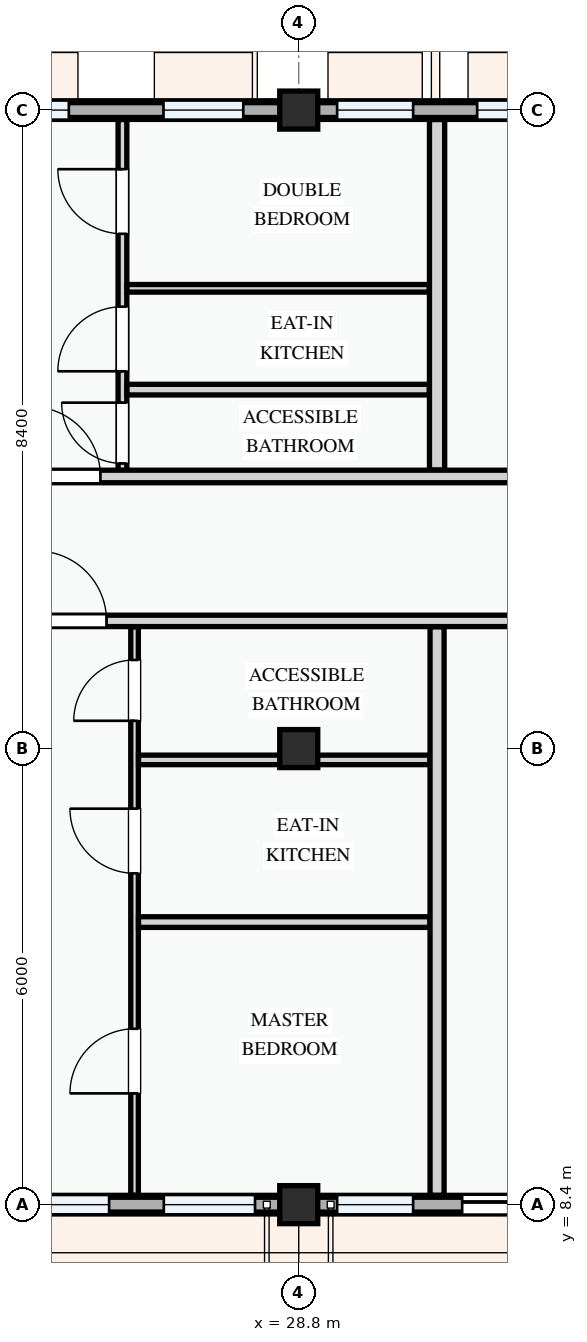
"""IFC4 building model, lengths in metres.
Left out: names, types, materials, properties, quantities, classifications, styles, units other than length and angle.
Written with IfcOpenShell. Run it as: python <this file> out.ifc"""

import sys

from ifc_helpers import new_model, si_unit, direction, frame, frame_2d, origin, origin_2d, place, context, subcontext, project, spatial, polyline, rectangle, outline, extrude, element, fill, save


model = new_model("IFC4")
c1 = context("Model", 3, precision=1e-05, world=origin(), true_north=direction((0.0, 1.0)))
c2 = subcontext(c1, "Body", "Model", "MODEL_VIEW")
j1 = project(units=[si_unit("LENGTHUNIT", "METRE"), si_unit("PLANEANGLEUNIT", "RADIAN")], contexts=[c1])
p1 = place(None, origin())
s1 = spatial("IfcSite", under=j1, at=p1, CompositionType="ELEMENT")
p2 = place(p1, origin())
s2 = spatial("IfcBuilding", under=s1, at=p2, CompositionType="ELEMENT")
p3 = place(p2, frame((0.0, 0.0, 34.5)))
s3 = spatial("IfcBuildingStorey", under=s2, at=p3, CompositionType="ELEMENT", Elevation=34.5)
for number, where, z_axis, x_axis in (
    (1, (28.8, 8.4, 0.0), (0.0, 0.0, 1.0), (1.0, 0.0, 0.0)),
    (2, (28.8, 14.4, 0.0), (0.0, 0.0, 1.0), (1.0, 0.0, 0.0)),
    (3, (28.8, 22.8, 0.0), (0.0, 0.0, 1.0), (1.0, 0.0, 0.0)),
):
    element("IfcColumn", number, at=place(p3, frame(where, z_axis=z_axis, x_axis=x_axis)), inside=s3, PredefinedType="COLUMN", context=c2, shape_type="SweptSolid", body=[
        extrude(rectangle(XDim=0.5, YDim=0.5, at=origin_2d()), origin(), (0.0, 0.0, 1.0), 3.3),
    ])
p4 = place(p3, frame((22.8, 8.4, 0.0), z_axis=(0.0, 0.0, 1.0), x_axis=(1.0, 0.0, 0.0)))
e4 = element("IfcWall", 4, at=p4, inside=s3, PredefinedType="STANDARD", context=c2, shape_type="SweptSolid", body=[
    extrude(rectangle(XDim=6.0, YDim=0.245, at=frame_2d((3.0, 0.0))), origin(), (0.0, 0.0, 1.0), 2.525),
])
p5 = place(p4, frame((0.62, 0.0, 0.0)))
e5 = element("IfcOpeningElement", 5, at=p5, cuts=e4, PredefinedType="OPENING", context=c2, shape_type="SweptSolid", body=[
    extrude(rectangle(XDim=1.3, YDim=2.15, at=frame_2d((0.65, 1.075))), frame((0.0, 0.133, 0.0), z_axis=(0.0, -1.0, 0.0), x_axis=(1.0, 0.0, 0.0)), (0.0, 0.0, 1.0), 0.265),
])
p6 = place(p4, frame((2.305, 0.0, 0.78)))
e6 = element("IfcOpeningElement", 6, at=p6, cuts=e4, PredefinedType="OPENING", context=c2, shape_type="SweptSolid", body=[
    extrude(rectangle(XDim=1.2, YDim=1.5, at=frame_2d((0.6, 0.75))), frame((0.0, 0.133, 0.0), z_axis=(0.0, -1.0, 0.0), x_axis=(1.0, 0.0, 0.0)), (0.0, 0.0, 1.0), 0.265),
])
p7 = place(p4, frame((4.225, 0.0, 0.78)))
e7 = element("IfcOpeningElement", 7, at=p7, cuts=e4, PredefinedType="OPENING", context=c2, shape_type="SweptSolid", body=[
    extrude(rectangle(XDim=1.2, YDim=1.35, at=frame_2d((0.6, 0.675))), frame((0.0, 0.133, 0.0), z_axis=(0.0, -1.0, 0.0), x_axis=(1.0, 0.0, 0.0)), (0.0, 0.0, 1.0), 0.265),
])
p8 = place(p3, frame((28.8, 8.4, 0.0), z_axis=(0.0, 0.0, 1.0), x_axis=(1.0, 0.0, 0.0)))
e8 = element("IfcWall", 8, at=p8, inside=s3, PredefinedType="STANDARD", context=c2, shape_type="SweptSolid", body=[
    extrude(rectangle(XDim=8.4, YDim=0.245, at=frame_2d((4.2, 0.0))), origin(), (0.0, 0.0, 1.0), 2.375),
])
p9 = place(p8, frame((2.15, 0.0, 0.0)))
e9 = element("IfcOpeningElement", 9, at=p9, cuts=e8, PredefinedType="OPENING", context=c2, shape_type="SweptSolid", body=[
    extrude(rectangle(XDim=1.4, YDim=2.2, at=frame_2d((0.7, 1.1))), frame((0.0, 0.133, 0.0), z_axis=(0.0, -1.0, 0.0), x_axis=(1.0, 0.0, 0.0)), (0.0, 0.0, 1.0), 0.265),
])
p10 = place(p8, frame((0.505, 0.0, 0.78)))
e10 = element("IfcOpeningElement", 10, at=p10, cuts=e8, PredefinedType="OPENING", context=c2, shape_type="SweptSolid", body=[
    extrude(rectangle(XDim=1.0, YDim=1.25, at=frame_2d((0.5, 0.625))), frame((0.0, 0.133, 0.0), z_axis=(0.0, -1.0, 0.0), x_axis=(1.0, 0.0, 0.0)), (0.0, 0.0, 1.0), 0.265),
])
p11 = place(p8, frame((4.54, 0.0, 0.78)))
e11 = element("IfcOpeningElement", 11, at=p11, cuts=e8, PredefinedType="OPENING", context=c2, shape_type="SweptSolid", body=[
    extrude(rectangle(XDim=1.2, YDim=1.35, at=frame_2d((0.6, 0.675))), frame((0.0, 0.133, 0.0), z_axis=(0.0, -1.0, 0.0), x_axis=(1.0, 0.0, 0.0)), (0.0, 0.0, 1.0), 0.265),
])
p12 = place(p8, frame((6.97, 0.0, 0.78)))
e12 = element("IfcOpeningElement", 12, at=p12, cuts=e8, PredefinedType="OPENING", context=c2, shape_type="SweptSolid", body=[
    extrude(rectangle(XDim=0.95, YDim=1.15, at=frame_2d((0.475, 0.575))), frame((0.0, 0.133, 0.0), z_axis=(0.0, -1.0, 0.0), x_axis=(1.0, 0.0, 0.0)), (0.0, 0.0, 1.0), 0.265),
])
p13 = place(p3, frame((37.2, 22.8, 0.0), z_axis=(0.0, 0.0, 1.0), x_axis=(-1.0, 0.0, 0.0)))
e13 = element("IfcWall", 13, at=p13, inside=s3, PredefinedType="STANDARD", context=c2, shape_type="SweptSolid", body=[
    extrude(rectangle(XDim=8.4, YDim=0.245, at=frame_2d((4.2, 0.0))), origin(), (0.0, 0.0, 1.0), 2.375),
])
p14 = place(p13, frame((0.505, 0.0, 0.78)))
e14 = element("IfcOpeningElement", 14, at=p14, cuts=e13, PredefinedType="OPENING", context=c2, shape_type="SweptSolid", body=[
    extrude(rectangle(XDim=0.95, YDim=1.15, at=frame_2d((0.475, 0.575))), frame((0.0, 0.133, 0.0), z_axis=(0.0, -1.0, 0.0), x_axis=(1.0, 0.0, 0.0)), (0.0, 0.0, 1.0), 0.265),
])
p15 = place(p13, frame((2.533, 0.0, 0.78)))
e15 = element("IfcOpeningElement", 15, at=p15, cuts=e13, PredefinedType="OPENING", context=c2, shape_type="SweptSolid", body=[
    extrude(rectangle(XDim=0.95, YDim=1.15, at=frame_2d((0.475, 0.575))), frame((0.0, 0.133, 0.0), z_axis=(0.0, -1.0, 0.0), x_axis=(1.0, 0.0, 0.0)), (0.0, 0.0, 1.0), 0.265),
])
p16 = place(p13, frame((4.633, 0.0, 0.78)))
e16 = element("IfcOpeningElement", 16, at=p16, cuts=e13, PredefinedType="OPENING", context=c2, shape_type="SweptSolid", body=[
    extrude(rectangle(XDim=1.42, YDim=1.38, at=frame_2d((0.71, 0.69))), frame((0.0, 0.133, 0.0), z_axis=(0.0, -1.0, 0.0), x_axis=(1.0, 0.0, 0.0)), (0.0, 0.0, 1.0), 0.265),
])
p17 = place(p13, frame((6.895, 0.0, 0.78)))
e17 = element("IfcOpeningElement", 17, at=p17, cuts=e13, PredefinedType="OPENING", context=c2, shape_type="SweptSolid", body=[
    extrude(rectangle(XDim=1.0, YDim=1.25, at=frame_2d((0.5, 0.625))), frame((0.0, 0.133, 0.0), z_axis=(0.0, -1.0, 0.0), x_axis=(1.0, 0.0, 0.0)), (0.0, 0.0, 1.0), 0.265),
])
p18 = place(p3, frame((28.8, 22.8, 0.0), z_axis=(0.0, 0.0, 1.0), x_axis=(-1.0, 0.0, 0.0)))
e18 = element("IfcWall", 18, at=p18, inside=s3, PredefinedType="STANDARD", context=c2, shape_type="SweptSolid", body=[
    extrude(rectangle(XDim=6.0, YDim=0.245, at=frame_2d((3.0, 0.0))), origin(), (0.0, 0.0, 1.0), 2.525),
])
p19 = place(p18, frame((0.729, 0.0, 0.78)))
e19 = element("IfcOpeningElement", 19, at=p19, cuts=e18, PredefinedType="OPENING", context=c2, shape_type="SweptSolid", body=[
    extrude(rectangle(XDim=1.05, YDim=1.2, at=frame_2d((0.525, 0.6))), frame((0.0, 0.133, 0.0), z_axis=(0.0, -1.0, 0.0), x_axis=(1.0, 0.0, 0.0)), (0.0, 0.0, 1.0), 0.265),
])
p20 = place(p18, frame((3.025, 0.0, 0.78)))
e20 = element("IfcOpeningElement", 20, at=p20, cuts=e18, PredefinedType="OPENING", context=c2, shape_type="SweptSolid", body=[
    extrude(rectangle(XDim=2.08, YDim=1.52, at=frame_2d((1.04, 0.76))), frame((0.0, 0.133, 0.0), z_axis=(0.0, -1.0, 0.0), x_axis=(1.0, 0.0, 0.0)), (0.0, 0.0, 1.0), 0.265),
])
p21 = place(p3, frame((22.8, 8.4, 3.3), z_axis=(0.0, 0.0, 1.0), x_axis=(1.0, 0.0, 0.0)))
e21 = element("IfcWall", 21, at=p21, inside=s3, PredefinedType="PARAPET", context=c2, shape_type="SweptSolid", body=[
    extrude(outline(polyline([(0.0, 0.0), (6.0, 0.0), (6.0, 1.12), (5.5, 1.322), (5.0, 1.484), (4.5, 1.618), (4.0, 1.717), (3.5, 1.779), (3.0, 1.8), (2.5, 1.779), (2.0, 1.717), (1.5, 1.618), (1.0, 1.484), (0.5, 1.322), (0.0, 1.12), (0.0, 0.0)])), frame((0.0, 0.098, 0.0), z_axis=(0.0, -1.0, 0.0), x_axis=(1.0, 0.0, 0.0)), (0.0, 0.0, 1.0), 0.195),
])
p22 = place(p3, frame((28.8, 8.4, 3.3), z_axis=(0.0, 0.0, 1.0), x_axis=(1.0, 0.0, 0.0)))
e22 = element("IfcWall", 22, at=p22, inside=s3, PredefinedType="PARAPET", context=c2, shape_type="SweptSolid", body=[
    extrude(outline(polyline([(0.0, 0.0), (8.4, 0.0), (8.4, 1.12), (7.7, 1.322), (7.0, 1.484), (6.3, 1.618), (5.6, 1.717), (4.9, 1.779), (4.2, 1.8), (3.5, 1.779), (2.8, 1.717), (2.1, 1.618), (1.4, 1.484), (0.7, 1.322), (0.0, 1.12), (0.0, 0.0)])), frame((0.0, 0.098, 0.0), z_axis=(0.0, -1.0, 0.0), x_axis=(1.0, 0.0, 0.0)), (0.0, 0.0, 1.0), 0.195),
])
p23 = place(p3, frame((43.2, 22.8, 3.3), z_axis=(0.0, 0.0, 1.0), x_axis=(-1.0, 0.0, 0.0)))
e23 = element("IfcWall", 23, at=p23, inside=s3, PredefinedType="PARAPET", context=c2, shape_type="SweptSolid", body=[
    extrude(rectangle(XDim=20.4, YDim=0.195, at=frame_2d((10.2, 0.0))), origin(), (0.0, 0.0, 1.0), 1.15),
])
p24 = place(p3, frame((26.64, 8.524, 0.0), z_axis=(0.0, 0.0, 1.0), x_axis=(0.0, 1.0, 0.0)))
e24 = element("IfcWall", 24, at=p24, inside=s3, PredefinedType="PARTITIONING", context=c2, shape_type="SweptSolid", body=[
    extrude(rectangle(XDim=7.479, YDim=0.1, at=frame_2d((3.739, 0.0))), origin(), (0.0, 0.0, 1.0), 3.0),
])
p25 = place(p24, frame((1.339, 0.0, 0.0)))
e25 = element("IfcOpeningElement", 25, at=p25, cuts=e24, PredefinedType="OPENING", context=c2, shape_type="SweptSolid", body=[
    extrude(rectangle(XDim=0.85, YDim=2.1, at=frame_2d((0.425, 1.05))), frame((0.0, 0.06, 0.0), z_axis=(0.0, -1.0, 0.0), x_axis=(1.0, 0.0, 0.0)), (0.0, 0.0, 1.0), 0.12),
])
p26 = place(p24, frame((4.235, 0.0, 0.0)))
e26 = element("IfcOpeningElement", 26, at=p26, cuts=e24, PredefinedType="OPENING", context=c2, shape_type="SweptSolid", body=[
    extrude(rectangle(XDim=0.85, YDim=2.1, at=frame_2d((0.425, 1.05))), frame((0.0, 0.06, 0.0), z_axis=(0.0, -1.0, 0.0), x_axis=(1.0, 0.0, 0.0)), (0.0, 0.0, 1.0), 0.12),
])
p27 = place(p24, frame((6.241, 0.0, 0.0)))
e27 = element("IfcOpeningElement", 27, at=p27, cuts=e24, PredefinedType="OPENING", context=c2, shape_type="SweptSolid", body=[
    extrude(rectangle(XDim=0.8, YDim=2.1, at=frame_2d((0.4, 1.05))), frame((0.0, 0.06, 0.0), z_axis=(0.0, -1.0, 0.0), x_axis=(1.0, 0.0, 0.0)), (0.0, 0.0, 1.0), 0.12),
])
p28 = place(p3, frame((26.692, 12.118, 0.0), z_axis=(0.0, 0.0, 1.0), x_axis=(1.0, 0.0, 0.0)))
e28 = element("IfcWall", 28, at=p28, inside=s3, PredefinedType="PARTITIONING", context=c2, shape_type="SweptSolid", body=[
    extrude(rectangle(XDim=3.833, YDim=0.14, at=frame_2d((1.917, 0.0))), origin(), (0.0, 0.0, 1.0), 3.0),
])
p29 = place(p3, frame((26.692, 14.251, 0.0), z_axis=(0.0, 0.0, 1.0), x_axis=(1.0, 0.0, 0.0)))
e29 = element("IfcWall", 29, at=p29, inside=s3, PredefinedType="PARTITIONING", context=c2, shape_type="SweptSolid", body=[
    extrude(rectangle(XDim=3.833, YDim=0.125, at=frame_2d((1.917, 0.0))), origin(), (0.0, 0.0, 1.0), 2.375),
])
p30 = place(p3, frame((26.481, 17.98, 0.0), z_axis=(0.0, 0.0, 1.0), x_axis=(0.0, 1.0, 0.0)))
e30 = element("IfcWall", 30, at=p30, inside=s3, PredefinedType="PARTITIONING", context=c2, shape_type="SweptSolid", body=[
    extrude(rectangle(XDim=4.696, YDim=0.115, at=frame_2d((2.348, 0.0))), origin(), (0.0, 0.0, 1.0), 3.0),
])
p31 = place(p30, frame((0.171, 0.0, 0.0)))
e31 = element("IfcOpeningElement", 31, at=p31, cuts=e30, PredefinedType="OPENING", context=c2, shape_type="SweptSolid", body=[
    extrude(rectangle(XDim=0.8, YDim=2.1, at=frame_2d((0.4, 1.05))), frame((0.0, 0.067, 0.0), z_axis=(0.0, -1.0, 0.0), x_axis=(1.0, 0.0, 0.0)), (0.0, 0.0, 1.0), 0.135),
])
p32 = place(p30, frame((1.384, 0.0, 0.0)))
e32 = element("IfcOpeningElement", 32, at=p32, cuts=e30, PredefinedType="OPENING", context=c2, shape_type="SweptSolid", body=[
    extrude(rectangle(XDim=0.85, YDim=2.1, at=frame_2d((0.425, 1.05))), frame((0.0, 0.067, 0.0), z_axis=(0.0, -1.0, 0.0), x_axis=(1.0, 0.0, 0.0)), (0.0, 0.0, 1.0), 0.135),
])
p33 = place(p30, frame((3.193, 0.0, 0.0)))
e33 = element("IfcOpeningElement", 33, at=p33, cuts=e30, PredefinedType="OPENING", context=c2, shape_type="SweptSolid", body=[
    extrude(rectangle(XDim=0.85, YDim=2.1, at=frame_2d((0.425, 1.05))), frame((0.0, 0.067, 0.0), z_axis=(0.0, -1.0, 0.0), x_axis=(1.0, 0.0, 0.0)), (0.0, 0.0, 1.0), 0.135),
])
p34 = place(p3, frame((26.54, 20.455, 0.0), z_axis=(0.0, 0.0, 1.0), x_axis=(1.0, 0.0, 0.0)))
e34 = element("IfcWall", 34, at=p34, inside=s3, PredefinedType="PARTITIONING", context=c2, shape_type="SweptSolid", body=[
    extrude(rectangle(XDim=3.978, YDim=0.1, at=frame_2d((1.989, 0.0))), origin(), (0.0, 0.0, 1.0), 3.0),
])
p35 = place(p3, frame((26.54, 19.122, 0.0), z_axis=(0.0, 0.0, 1.0), x_axis=(1.0, 0.0, 0.0)))
e35 = element("IfcWall", 35, at=p35, inside=s3, PredefinedType="PARTITIONING", context=c2, shape_type="SweptSolid", body=[
    extrude(rectangle(XDim=3.978, YDim=0.14, at=frame_2d((1.989, 0.0))), origin(), (0.0, 0.0, 1.0), 3.0),
])
p36 = place(p3, frame((30.62, 8.524, 0.0), z_axis=(0.0, 0.0, 1.0), x_axis=(0.0, 1.0, 0.0)))
e36 = element("IfcWall", 36, at=p36, inside=s3, PredefinedType="PARTITIONING", context=c2, shape_type="SweptSolid", body=[
    extrude(rectangle(XDim=7.479, YDim=0.185, at=frame_2d((3.739, 0.0))), origin(), (0.0, 0.0, 1.0), 3.0),
])
p37 = place(p3, frame((30.62, 18.064, 0.0), z_axis=(0.0, 0.0, 1.0), x_axis=(0.0, 1.0, 0.0)))
e37 = element("IfcWall", 37, at=p37, inside=s3, PredefinedType="PARTITIONING", context=c2, shape_type="SweptSolid", body=[
    extrude(rectangle(XDim=4.611, YDim=0.2, at=frame_2d((2.306, 0.0))), origin(), (0.0, 0.0, 1.0), 3.0),
])
p38 = place(p3, frame((22.66, 16.08, 0.0), z_axis=(0.0, 0.0, 1.0), x_axis=(1.0, 0.0, 0.0)))
e38 = element("IfcWall", 38, at=p38, inside=s3, PredefinedType="PARTITIONING", context=c2, shape_type="SweptSolid", body=[
    extrude(rectangle(XDim=20.416, YDim=0.15, at=frame_2d((10.208, 0.0))), origin(), (0.0, 0.0, 1.0), 3.0),
])
p39 = place(p38, frame((2.691, 0.0, 0.0)))
e39 = element("IfcOpeningElement", 39, at=p39, cuts=e38, PredefinedType="OPENING", context=c2, shape_type="SweptSolid", body=[
    extrude(rectangle(XDim=0.92, YDim=2.1, at=frame_2d((0.46, 1.05))), frame((0.0, 0.085, 0.0), z_axis=(0.0, -1.0, 0.0), x_axis=(1.0, 0.0, 0.0)), (0.0, 0.0, 1.0), 0.17),
])
p40 = place(p38, frame((9.91, 0.0, 0.0)))
e40 = element("IfcOpeningElement", 40, at=p40, cuts=e38, PredefinedType="OPENING", context=c2, shape_type="SweptSolid", body=[
    extrude(rectangle(XDim=0.92, YDim=2.1, at=frame_2d((0.46, 1.05))), frame((0.0, 0.085, 0.0), z_axis=(0.0, -1.0, 0.0), x_axis=(1.0, 0.0, 0.0)), (0.0, 0.0, 1.0), 0.17),
])
p41 = place(p3, frame((22.66, 17.98, 0.0), z_axis=(0.0, 0.0, 1.0), x_axis=(1.0, 0.0, 0.0)))
e41 = element("IfcWall", 41, at=p41, inside=s3, PredefinedType="PARTITIONING", context=c2, shape_type="SweptSolid", body=[
    extrude(rectangle(XDim=20.416, YDim=0.165, at=frame_2d((10.208, 0.0))), origin(), (0.0, 0.0, 1.0), 3.0),
])
p42 = place(p41, frame((2.611, 0.0, 0.0)))
e42 = element("IfcOpeningElement", 42, at=p42, cuts=e41, PredefinedType="OPENING", context=c2, shape_type="SweptSolid", body=[
    extrude(rectangle(XDim=0.92, YDim=2.1, at=frame_2d((0.46, 1.05))), frame((0.0, 0.093, 0.0), z_axis=(0.0, -1.0, 0.0), x_axis=(1.0, 0.0, 0.0)), (0.0, 0.0, 1.0), 0.185),
])
p43 = place(p41, frame((9.885, 0.0, 0.0)))
e43 = element("IfcOpeningElement", 43, at=p43, cuts=e41, PredefinedType="OPENING", context=c2, shape_type="SweptSolid", body=[
    extrude(rectangle(XDim=0.96, YDim=2.12, at=frame_2d((0.48, 1.06))), frame((0.0, 0.093, 0.0), z_axis=(0.0, -1.0, 0.0), x_axis=(1.0, 0.0, 0.0)), (0.0, 0.0, 1.0), 0.185),
])
p44 = place(p6, origin())
e44 = element("IfcWindow", 44, at=p44, inside=s3, PartitioningType="SINGLE_PANEL", PredefinedType="WINDOW", context=c2, shape_type="SweptSolid", body=[
    extrude(rectangle(XDim=1.2, YDim=1.5, at=frame_2d((0.6, 0.75))), frame((0.0, 0.03, 0.0), z_axis=(0.0, -1.0, 0.0), x_axis=(1.0, 0.0, 0.0)), (0.0, 0.0, 1.0), 0.06),
])
fill(e6, e44)
p45 = place(p7, origin())
e45 = element("IfcWindow", 45, at=p45, inside=s3, PartitioningType="SINGLE_PANEL", PredefinedType="WINDOW", context=c2, shape_type="SweptSolid", body=[
    extrude(rectangle(XDim=1.2, YDim=1.35, at=frame_2d((0.6, 0.675))), frame((0.0, 0.03, 0.0), z_axis=(0.0, -1.0, 0.0), x_axis=(1.0, 0.0, 0.0)), (0.0, 0.0, 1.0), 0.06),
])
fill(e7, e45)
p46 = place(p9, frame((1.4, 0.0, 0.0), z_axis=(0.0, 0.0, 1.0), x_axis=(-1.0, 0.0, 0.0)))
e46 = element("IfcDoor", 46, at=p46, inside=s3, OperationType="SLIDING_TO_LEFT", PredefinedType="DOOR", context=c2, shape_type="SweptSolid", body=[
    extrude(rectangle(XDim=1.4, YDim=2.2, at=frame_2d((0.7, 1.1))), frame((0.0, 0.025, 0.0), z_axis=(0.0, -1.0, 0.0), x_axis=(1.0, 0.0, 0.0)), (0.0, 0.0, 1.0), 0.05),
])
fill(e9, e46)
p47 = place(p10, origin())
e47 = element("IfcWindow", 47, at=p47, inside=s3, PartitioningType="SINGLE_PANEL", PredefinedType="WINDOW", context=c2, shape_type="SweptSolid", body=[
    extrude(rectangle(XDim=1.0, YDim=1.25, at=frame_2d((0.5, 0.625))), frame((0.0, 0.03, 0.0), z_axis=(0.0, -1.0, 0.0), x_axis=(1.0, 0.0, 0.0)), (0.0, 0.0, 1.0), 0.06),
])
fill(e10, e47)
p48 = place(p16, origin())
e48 = element("IfcWindow", 48, at=p48, inside=s3, PartitioningType="SINGLE_PANEL", PredefinedType="WINDOW", context=c2, shape_type="SweptSolid", body=[
    extrude(rectangle(XDim=1.42, YDim=1.38, at=frame_2d((0.71, 0.69))), frame((0.0, 0.03, 0.0), z_axis=(0.0, -1.0, 0.0), x_axis=(1.0, 0.0, 0.0)), (0.0, 0.0, 1.0), 0.06),
])
fill(e16, e48)
p49 = place(p17, origin())
e49 = element("IfcWindow", 49, at=p49, inside=s3, PartitioningType="SINGLE_PANEL", PredefinedType="WINDOW", context=c2, shape_type="SweptSolid", body=[
    extrude(rectangle(XDim=1.0, YDim=1.25, at=frame_2d((0.5, 0.625))), frame((0.0, 0.03, 0.0), z_axis=(0.0, -1.0, 0.0), x_axis=(1.0, 0.0, 0.0)), (0.0, 0.0, 1.0), 0.06),
])
fill(e17, e49)
p50 = place(p19, origin())
e50 = element("IfcWindow", 50, at=p50, inside=s3, PartitioningType="SINGLE_PANEL", PredefinedType="WINDOW", context=c2, shape_type="SweptSolid", body=[
    extrude(rectangle(XDim=1.05, YDim=1.2, at=frame_2d((0.525, 0.6))), frame((0.0, 0.03, 0.0), z_axis=(0.0, -1.0, 0.0), x_axis=(1.0, 0.0, 0.0)), (0.0, 0.0, 1.0), 0.06),
])
fill(e19, e50)
p51 = place(p20, origin())
e51 = element("IfcWindow", 51, at=p51, inside=s3, PartitioningType="DOUBLE_PANEL_VERTICAL", PredefinedType="WINDOW", context=c2, shape_type="SweptSolid", body=[
    extrude(rectangle(XDim=2.08, YDim=1.52, at=frame_2d((1.04, 0.76))), frame((0.0, 0.03, 0.0), z_axis=(0.0, -1.0, 0.0), x_axis=(1.0, 0.0, 0.0)), (0.0, 0.0, 1.0), 0.06),
])
fill(e20, e51)
p52 = place(p25, origin())
e52 = element("IfcDoor", 52, at=p52, inside=s3, OperationType="SINGLE_SWING_LEFT", PredefinedType="DOOR", context=c2, shape_type="SweptSolid", body=[
    extrude(rectangle(XDim=0.85, YDim=2.1, at=frame_2d((0.425, 1.05))), frame((0.0, 0.025, 0.0), z_axis=(0.0, -1.0, 0.0), x_axis=(1.0, 0.0, 0.0)), (0.0, 0.0, 1.0), 0.05),
])
fill(e25, e52)
p53 = place(p26, origin())
e53 = element("IfcDoor", 53, at=p53, inside=s3, OperationType="SINGLE_SWING_RIGHT", PredefinedType="DOOR", context=c2, shape_type="SweptSolid", body=[
    extrude(rectangle(XDim=0.85, YDim=2.1, at=frame_2d((0.425, 1.05))), frame((0.0, 0.025, 0.0), z_axis=(0.0, -1.0, 0.0), x_axis=(1.0, 0.0, 0.0)), (0.0, 0.0, 1.0), 0.05),
])
fill(e26, e53)
p54 = place(p27, origin())
e54 = element("IfcDoor", 54, at=p54, inside=s3, OperationType="SINGLE_SWING_LEFT", PredefinedType="DOOR", context=c2, shape_type="SweptSolid", body=[
    extrude(rectangle(XDim=0.8, YDim=2.1, at=frame_2d((0.4, 1.05))), frame((0.0, 0.025, 0.0), z_axis=(0.0, -1.0, 0.0), x_axis=(1.0, 0.0, 0.0)), (0.0, 0.0, 1.0), 0.05),
])
fill(e27, e54)
p55 = place(p31, origin())
e55 = element("IfcDoor", 55, at=p55, inside=s3, OperationType="SINGLE_SWING_RIGHT", PredefinedType="DOOR", context=c2, shape_type="SweptSolid", body=[
    extrude(rectangle(XDim=0.8, YDim=2.1, at=frame_2d((0.4, 1.05))), frame((0.0, 0.025, 0.0), z_axis=(0.0, -1.0, 0.0), x_axis=(1.0, 0.0, 0.0)), (0.0, 0.0, 1.0), 0.05),
])
fill(e31, e55)
p56 = place(p32, origin())
e56 = element("IfcDoor", 56, at=p56, inside=s3, OperationType="SINGLE_SWING_LEFT", PredefinedType="DOOR", context=c2, shape_type="SweptSolid", body=[
    extrude(rectangle(XDim=0.85, YDim=2.1, at=frame_2d((0.425, 1.05))), frame((0.0, 0.025, 0.0), z_axis=(0.0, -1.0, 0.0), x_axis=(1.0, 0.0, 0.0)), (0.0, 0.0, 1.0), 0.05),
])
fill(e32, e56)
p57 = place(p33, origin())
e57 = element("IfcDoor", 57, at=p57, inside=s3, OperationType="SINGLE_SWING_RIGHT", PredefinedType="DOOR", context=c2, shape_type="SweptSolid", body=[
    extrude(rectangle(XDim=0.85, YDim=2.1, at=frame_2d((0.425, 1.05))), frame((0.0, 0.025, 0.0), z_axis=(0.0, -1.0, 0.0), x_axis=(1.0, 0.0, 0.0)), (0.0, 0.0, 1.0), 0.05),
])
fill(e33, e57)
p58 = place(p39, origin())
e58 = element("IfcDoor", 58, at=p58, inside=s3, OperationType="SINGLE_SWING_LEFT", PredefinedType="DOOR", context=c2, shape_type="SweptSolid", body=[
    extrude(rectangle(XDim=0.92, YDim=2.1, at=frame_2d((0.46, 1.05))), frame((0.0, 0.025, 0.0), z_axis=(0.0, -1.0, 0.0), x_axis=(1.0, 0.0, 0.0)), (0.0, 0.0, 1.0), 0.05),
])
fill(e39, e58)
p59 = place(p42, origin())
e59 = element("IfcDoor", 59, at=p59, inside=s3, OperationType="SINGLE_SWING_LEFT", PredefinedType="DOOR", context=c2, shape_type="SweptSolid", body=[
    extrude(rectangle(XDim=0.92, YDim=2.1, at=frame_2d((0.46, 1.05))), frame((0.0, 0.025, 0.0), z_axis=(0.0, -1.0, 0.0), x_axis=(1.0, 0.0, 0.0)), (0.0, 0.0, 1.0), 0.05),
])
fill(e42, e59)
save(model, sys.argv[1])
